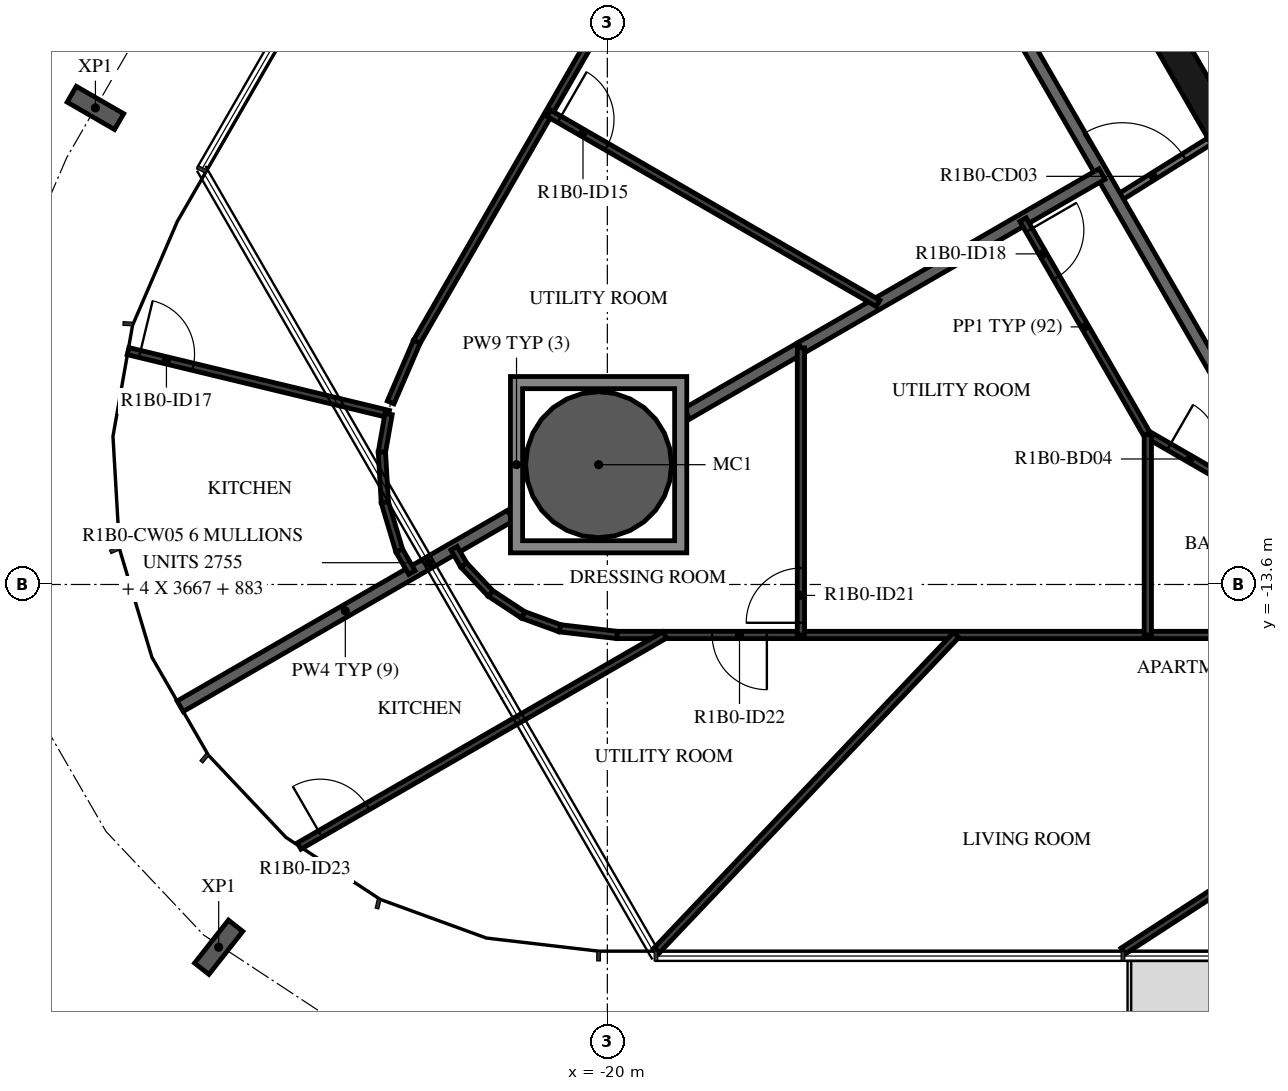
"""IFC4 building model, lengths in metres.
Left out: names, types, materials, properties, quantities, classifications, styles, units other than length and angle.
Written with IfcOpenShell. Run it as: python <this file> out.ifc"""

import sys

from ifc_helpers import new_model, si_unit, direction, frame, frame_2d, origin, origin_2d, place, context, subcontext, project, spatial, polyline, rectangle, hollow_circle, i_section, outline, extrude, element, fill, save


model = new_model("IFC4")
c1 = context("Model", 3, precision=1e-05, world=origin(), true_north=direction((0.0, 1.0)))
c2 = subcontext(c1, "Body", "Model", "MODEL_VIEW")
j1 = project(units=[si_unit("LENGTHUNIT", "METRE"), si_unit("PLANEANGLEUNIT", "RADIAN")], contexts=[c1])
p1 = place(None, origin())
s1 = spatial("IfcSite", under=j1, at=p1, CompositionType="ELEMENT")
p2 = place(p1, origin())
s2 = spatial("IfcBuilding", under=s1, at=p2, CompositionType="ELEMENT")
p3 = place(p2, frame((0.0, 0.0, 52.4)))
s3 = spatial("IfcBuildingStorey", under=s2, at=p3, CompositionType="ELEMENT", Elevation=52.4)
p4 = place(p3, frame((-20.144, -11.63, -0.38), z_axis=(0.0, 0.0, 1.0), x_axis=(1.0, 0.0, 0.0)))
e1 = element("IfcColumn", 1, at=p4, inside=s3, PredefinedType="COLUMN", context=c2, shape_type="SweptSolid", body=[
    extrude(hollow_circle(Radius=1.2, WallThickness=0.06, at=origin_2d()), origin(), (0.0, 0.0, 1.0), 3.5),
])
for number, where, z_axis, x_axis in (
    (2, (-28.419, -5.763, -0.38), (0.0, 0.0, 1.0), (0.5, 0.866, 0.0)),
    (3, (-26.392, -19.565, -0.38), (0.0, 0.0, 1.0), (-0.786, 0.619, 0.0)),
):
    element("IfcColumn", number, at=place(p3, frame(where, z_axis=z_axis, x_axis=x_axis)), inside=s3, PredefinedType="COLUMN", context=c2, shape_type="SweptSolid", body=[
        extrude(i_section(OverallWidth=0.3, OverallDepth=0.9, WebThickness=0.019, FlangeThickness=0.035, FilletRadius=0.03, at=origin_2d()), origin(), (0.0, 0.0, 1.0), 3.5),
    ])
p5 = place(p3, frame((-10.845, -4.51, 0.0), z_axis=(0.0, 0.0, 1.0), x_axis=(0.500087131594, -0.865975092491, 0.0)))
e4 = element("IfcWall", 4, at=p5, inside=s3, PredefinedType="SHEAR", context=c2, shape_type="SweptSolid", body=[
    extrude(rectangle(XDim=3.033, YDim=0.5, at=frame_2d((1.516, 0.0))), origin(), (0.0, 0.0, 1.0), 3.12),
])
p6 = place(p3, frame((-11.625, -7.264, 0.0), z_axis=(0.0, 0.0, 1.0), x_axis=(0.84803632456, 0.529938102259, 0.0)))
e5 = element("IfcWall", 5, at=p6, inside=s3, PredefinedType="PARTITIONING", context=c2, shape_type="SweptSolid", body=[
    extrude(rectangle(XDim=1.804, YDim=0.12, at=frame_2d((0.902, 0.0))), origin(), (0.0, 0.0, 1.0), 3.12),
])
p7 = place(p6, frame((0.11, 0.0, 0.0)))
e6 = element("IfcOpeningElement", 6, at=p7, cuts=e5, PredefinedType="OPENING", context=c2, shape_type="SweptSolid", body=[
    extrude(rectangle(XDim=1.2, YDim=2.1, at=frame_2d((0.6, 1.05))), frame((0.0, 0.07, 0.0), z_axis=(0.0, -1.0, 0.0), x_axis=(1.0, 0.0, 0.0)), (0.0, 0.0, 1.0), 0.14),
])
p8 = place(p3, frame((-13.7, -3.671, 0.0), z_axis=(0.0, 0.0, 1.0), x_axis=(0.500001669485, -0.866024439905, 0.0)))
e7 = element("IfcWall", 7, at=p8, inside=s3, PredefinedType="STANDARD", context=c2, shape_type="SweptSolid", body=[
    extrude(rectangle(XDim=7.342, YDim=0.2, at=frame_2d((3.671, 0.0))), origin(), (0.0, 0.0, 1.0), 3.12),
])
p9 = place(p3, frame((-16.817, -9.709, 0.0), z_axis=(0.0, 0.0, 1.0), x_axis=(0.86604338933, 0.499968846828, 0.0)))
e8 = element("IfcWall", 8, at=p9, inside=s3, PredefinedType="STANDARD", context=c2, shape_type="SweptSolid", body=[
    extrude(rectangle(XDim=5.718, YDim=0.2, at=frame_2d((2.859, 0.0))), origin(), (0.0, 0.0, 1.0), 3.12),
])
p10 = place(p3, frame((-27.025, -15.603, 0.0), z_axis=(0.0, 0.0, 1.0), x_axis=(0.866030653443, 0.499990907215, 0.0)))
e9 = element("IfcWall", 9, at=p10, inside=s3, PredefinedType="STANDARD", context=c2, shape_type="SweptSolid", body=[
    extrude(rectangle(XDim=6.271, YDim=0.2, at=frame_2d((3.136, 0.0))), origin(), (0.0, 0.0, 1.0), 3.12),
])
p11 = place(p3, frame((-18.694, -10.793, 0.0), z_axis=(0.0, 0.0, 1.0), x_axis=(0.866009251978, 0.500027974705, 0.0)))
e10 = element("IfcWall", 10, at=p11, inside=s3, PredefinedType="STANDARD", context=c2, shape_type="SweptSolid", body=[
    extrude(rectangle(XDim=2.167, YDim=0.2, at=frame_2d((1.084, 0.0))), origin(), (0.0, 0.0, 1.0), 3.12),
])
p12 = place(p3, frame((-17.13, 0.79, 0.0), z_axis=(0.0, 0.0, 1.0), x_axis=(-0.499997052475, -0.866027105532, 0.0)))
e11 = element("IfcWall", 11, at=p12, inside=s3, PredefinedType="PARTITIONING", context=c2, shape_type="SweptSolid", body=[
    extrude(rectangle(XDim=12.006, YDim=0.12, at=frame_2d((6.003, 0.0))), origin(), (0.0, 0.0, 1.0), 3.12),
])
p13 = place(p12, frame((1.498, 0.0, 0.0)))
e12 = element("IfcOpeningElement", 12, at=p13, cuts=e11, PredefinedType="OPENING", context=c2, shape_type="SweptSolid", body=[
    extrude(rectangle(XDim=0.9, YDim=2.1, at=frame_2d((0.45, 1.05))), frame((0.0, 0.07, 0.0), z_axis=(0.0, -1.0, 0.0), x_axis=(1.0, 0.0, 0.0)), (0.0, 0.0, 1.0), 0.14),
])
p14 = place(p3, frame((-20.963, -5.85, 0.0), z_axis=(0.0, 0.0, 1.0), x_axis=(0.866021746608, -0.500006334362, 0.0)))
e13 = element("IfcWall", 13, at=p14, inside=s3, PredefinedType="PARTITIONING", context=c2, shape_type="SweptSolid", body=[
    extrude(rectangle(XDim=6.253, YDim=0.12, at=frame_2d((3.127, 0.0))), origin(), (0.0, 0.0, 1.0), 3.12),
])
p15 = place(p14, frame((0.2, 0.0, 0.0)))
e14 = element("IfcOpeningElement", 14, at=p15, cuts=e13, PredefinedType="OPENING", context=c2, shape_type="SweptSolid", body=[
    extrude(rectangle(XDim=0.9, YDim=2.1, at=frame_2d((0.45, 1.05))), frame((0.0, 0.07, 0.0), z_axis=(0.0, -1.0, 0.0), x_axis=(1.0, 0.0, 0.0)), (0.0, 0.0, 1.0), 0.14),
])
p16 = place(p3, frame((-23.564, -10.606, 0.0), z_axis=(0.0, 0.0, 1.0), x_axis=(0.396195073027, 0.918166359713, 0.0)))
e15 = element("IfcWall", 15, at=p16, inside=s3, PredefinedType="PARTITIONING", context=c2, shape_type="SweptSolid", body=[
    extrude(rectangle(XDim=1.087, YDim=0.12, at=frame_2d((0.543, 0.0))), origin(), (0.0, 0.0, 1.0), 3.12),
])
p17 = place(p3, frame((-27.883, -9.762, 0.0), z_axis=(0.0, 0.0, 1.0), x_axis=(0.972097015458, -0.234579181809, 0.0)))
e16 = element("IfcWall", 16, at=p17, inside=s3, PredefinedType="PARTITIONING", context=c2, shape_type="SweptSolid", body=[
    extrude(rectangle(XDim=4.409, YDim=0.12, at=frame_2d((2.204, 0.0))), origin(), (0.0, 0.0, 1.0), 3.12),
])
p18 = place(p17, frame((0.2, 0.0, 0.0)))
e17 = element("IfcOpeningElement", 17, at=p18, cuts=e16, PredefinedType="OPENING", context=c2, shape_type="SweptSolid", body=[
    extrude(rectangle(XDim=0.9, YDim=2.1, at=frame_2d((0.45, 1.05))), frame((0.0, 0.07, 0.0), z_axis=(0.0, -1.0, 0.0), x_axis=(1.0, 0.0, 0.0)), (0.0, 0.0, 1.0), 0.14),
])
p19 = place(p3, frame((-23.597, -10.796, 0.0), z_axis=(0.0, 0.0, 1.0), x_axis=(-0.173610040386, -0.984814476882, 0.0)))
e18 = element("IfcWall", 18, at=p19, inside=s3, PredefinedType="PARTITIONING", context=c2, shape_type="SweptSolid", body=[
    extrude(rectangle(XDim=0.636, YDim=0.12, at=frame_2d((0.318, 0.0))), origin(), (0.0, 0.0, 1.0), 3.12),
])
p20 = place(p3, frame((-23.708, -11.422, 0.0), z_axis=(0.0, 0.0, 1.0), x_axis=(0.058031280246, -0.998314765248, 0.0)))
e19 = element("IfcWall", 19, at=p20, inside=s3, PredefinedType="PARTITIONING", context=c2, shape_type="SweptSolid", body=[
    extrude(rectangle(XDim=0.829, YDim=0.12, at=frame_2d((0.415, 0.0))), origin(), (0.0, 0.0, 1.0), 3.12),
])
p21 = place(p3, frame((-23.659, -12.25, 0.0), z_axis=(0.0, 0.0, 1.0), x_axis=(0.286834510868, -0.957980147694, 0.0)))
e20 = element("IfcWall", 20, at=p21, inside=s3, PredefinedType="PARTITIONING", context=c2, shape_type="SweptSolid", body=[
    extrude(rectangle(XDim=0.829, YDim=0.12, at=frame_2d((0.415, 0.0))), origin(), (0.0, 0.0, 1.0), 3.12),
])
p22 = place(p3, frame((-23.422, -13.044, 0.0), z_axis=(0.0, 0.0, 1.0), x_axis=(0.50013037474, -0.865950118807, 0.0)))
e21 = element("IfcWall", 21, at=p22, inside=s3, PredefinedType="PARTITIONING", context=c2, shape_type="SweptSolid", body=[
    extrude(rectangle(XDim=0.415, YDim=0.12, at=frame_2d((0.207, 0.0))), origin(), (0.0, 0.0, 1.0), 3.12),
])
p23 = place(p3, frame((-13.164, -7.6, 0.0), z_axis=(0.0, 0.0, 1.0), x_axis=(0.500000928893, -0.866024867487, 0.0)))
e22 = element("IfcWall", 22, at=p23, inside=s3, PredefinedType="PARTITIONING", context=c2, shape_type="SweptSolid", body=[
    extrude(rectangle(XDim=4.073, YDim=0.12, at=frame_2d((2.036, 0.0))), origin(), (0.0, 0.0, 1.0), 3.12),
])
p24 = place(p23, frame((0.2, 0.0, 0.0)))
e23 = element("IfcOpeningElement", 23, at=p24, cuts=e22, PredefinedType="OPENING", context=c2, shape_type="SweptSolid", body=[
    extrude(rectangle(XDim=0.9, YDim=2.1, at=frame_2d((0.45, 1.05))), frame((0.0, 0.07, 0.0), z_axis=(0.0, -1.0, 0.0), x_axis=(1.0, 0.0, 0.0)), (0.0, 0.0, 1.0), 0.14),
])
p25 = place(p3, frame((-11.112, -11.136, 0.0), z_axis=(0.0, 0.0, 1.0), x_axis=(0.866017718408, -0.500013311227, 0.0)))
e24 = element("IfcWall", 24, at=p25, inside=s3, PredefinedType="PARTITIONING", context=c2, shape_type="SweptSolid", body=[
    extrude(rectangle(XDim=6.588, YDim=0.12, at=frame_2d((3.294, 0.0))), origin(), (0.0, 0.0, 1.0), 3.12),
])
p26 = place(p25, frame((0.4, 0.0, 0.0)))
e25 = element("IfcOpeningElement", 25, at=p26, cuts=e24, PredefinedType="OPENING", context=c2, shape_type="SweptSolid", body=[
    extrude(rectangle(XDim=0.8, YDim=2.1, at=frame_2d((0.4, 1.05))), frame((0.0, 0.07, 0.0), z_axis=(0.0, -1.0, 0.0), x_axis=(1.0, 0.0, 0.0)), (0.0, 0.0, 1.0), 0.14),
])
p27 = place(p3, frame((-5.407, -14.43, 0.0), z_axis=(0.0, 0.0, 1.0), x_axis=(-1.0, 0.0, 0.0)))
e26 = element("IfcWall", 26, at=p27, inside=s3, PredefinedType="PARTITIONING", context=c2, shape_type="SweptSolid", body=[
    extrude(rectangle(XDim=14.434, YDim=0.12, at=frame_2d((7.217, 0.0))), origin(), (0.0, 0.0, 1.0), 3.12),
])
p28 = place(p27, frame((11.97, 0.0, 0.0)))
e27 = element("IfcOpeningElement", 27, at=p28, cuts=e26, PredefinedType="OPENING", context=c2, shape_type="SweptSolid", body=[
    extrude(rectangle(XDim=0.9, YDim=2.1, at=frame_2d((0.45, 1.05))), frame((0.0, 0.07, 0.0), z_axis=(0.0, -1.0, 0.0), x_axis=(1.0, 0.0, 0.0)), (0.0, 0.0, 1.0), 0.14),
])
p29 = place(p3, frame((-19.841, -14.43, 0.0), z_axis=(0.0, 0.0, 1.0), x_axis=(-0.993245320107, 0.116033331788, 0.0)))
e28 = element("IfcWall", 28, at=p29, inside=s3, PredefinedType="PARTITIONING", context=c2, shape_type="SweptSolid", body=[
    extrude(rectangle(XDim=0.947, YDim=0.12, at=frame_2d((0.473, 0.0))), origin(), (0.0, 0.0, 1.0), 3.12),
])
for number, where, z_axis, x_axis in (
    (29, (-20.781, -14.32, 0.0), (0.0, 0.0, 1.0), (-0.94, 0.342, 0.0)),
    (30, (-21.385, -14.101, 0.0), (0.0, 0.0, 1.0), (-0.835, 0.55, 0.0)),
    (31, (-21.921, -13.748, 0.0), (0.0, 0.0, 1.0), (-0.686, 0.727, 0.0)),
):
    element("IfcWall", number, at=place(p3, frame(where, z_axis=z_axis, x_axis=x_axis)), inside=s3, PredefinedType="PARTITIONING", context=c2, shape_type="SweptSolid", body=[
        extrude(rectangle(XDim=0.642, YDim=0.12, at=frame_2d((0.321, 0.0))), origin(), (0.0, 0.0, 1.0), 3.12),
    ])
p30 = place(p3, frame((-22.361, -13.281, 0.0), z_axis=(0.0, 0.0, 1.0), x_axis=(-0.499656614129, 0.86622356696, 0.0)))
e32 = element("IfcWall", 32, at=p30, inside=s3, PredefinedType="PARTITIONING", context=c2, shape_type="SweptSolid", body=[
    extrude(rectangle(XDim=0.321, YDim=0.12, at=frame_2d((0.161, 0.0))), origin(), (0.0, 0.0, 1.0), 3.12),
])
p31 = place(p3, frame((-25.068, -17.901, 0.0), z_axis=(0.0, 0.0, 1.0), x_axis=(0.866025136247, 0.500000463387, 0.0)))
e33 = element("IfcWall", 33, at=p31, inside=s3, PredefinedType="PARTITIONING", context=c2, shape_type="SweptSolid", body=[
    extrude(rectangle(XDim=6.943, YDim=0.12, at=frame_2d((3.471, 0.0))), origin(), (0.0, 0.0, 1.0), 3.12),
])
p32 = place(p31, frame((0.4, 0.0, 0.0)))
e34 = element("IfcOpeningElement", 34, at=p32, cuts=e33, PredefinedType="OPENING", context=c2, shape_type="SweptSolid", body=[
    extrude(rectangle(XDim=0.9, YDim=2.1, at=frame_2d((0.45, 1.05))), frame((0.0, 0.07, 0.0), z_axis=(0.0, -1.0, 0.0), x_axis=(1.0, 0.0, 0.0)), (0.0, 0.0, 1.0), 0.14),
])
p33 = place(p3, frame((-16.817, -14.43, 0.0), z_axis=(0.0, 0.0, 1.0), x_axis=(0.0, 1.0, 0.0)))
e35 = element("IfcWall", 35, at=p33, inside=s3, PredefinedType="PARTITIONING", context=c2, shape_type="SweptSolid", body=[
    extrude(rectangle(XDim=4.721, YDim=0.12, at=frame_2d((2.36, 0.0))), origin(), (0.0, 0.0, 1.0), 3.12),
])
p34 = place(p33, frame((0.2, 0.0, 0.0)))
e36 = element("IfcOpeningElement", 36, at=p34, cuts=e35, PredefinedType="OPENING", context=c2, shape_type="SweptSolid", body=[
    extrude(rectangle(XDim=0.9, YDim=2.1, at=frame_2d((0.45, 1.05))), frame((0.0, 0.07, 0.0), z_axis=(0.0, -1.0, 0.0), x_axis=(1.0, 0.0, 0.0)), (0.0, 0.0, 1.0), 0.14),
])
p35 = place(p3, frame((-11.112, -14.43, 0.0), z_axis=(0.0, 0.0, 1.0), x_axis=(0.0, 1.0, 0.0)))
e37 = element("IfcWall", 37, at=p35, inside=s3, PredefinedType="PARTITIONING", context=c2, shape_type="SweptSolid", body=[
    extrude(rectangle(XDim=3.294, YDim=0.12, at=frame_2d((1.647, 0.0))), origin(), (0.0, 0.0, 1.0), 3.12),
])
p36 = place(p3, frame((-19.2, -19.63, 0.0), z_axis=(0.0, 0.0, 1.0), x_axis=(0.688551680792, 0.72518727435, 0.0)))
e38 = element("IfcWall", 38, at=p36, inside=s3, PredefinedType="PARTITIONING", context=c2, shape_type="SweptSolid", body=[
    extrude(rectangle(XDim=7.17, YDim=0.12, at=frame_2d((3.585, 0.0))), origin(), (0.0, 0.0, 1.0), 3.12),
])
p37 = place(p3, frame((-11.52, -19.63, 0.0), z_axis=(0.0, 0.0, 1.0), x_axis=(0.838545516556, 0.544831548888, 0.0)))
e39 = element("IfcWall", 39, at=p37, inside=s3, PredefinedType="PARTITIONING", context=c2, shape_type="SweptSolid", body=[
    extrude(rectangle(XDim=6.677, YDim=0.12, at=frame_2d((3.339, 0.0))), origin(), (0.0, 0.0, 1.0), 3.12),
])
p38 = place(p3, origin())
e40 = element("IfcWall", 40, at=p38, inside=s3, PredefinedType="STANDARD", context=c2, shape_type="SweptSolid", body=[
    extrude(outline(polyline([(-18.694, -10.18), (-18.694, -13.08), (-21.594, -13.08), (-21.594, -10.18), (-18.694, -10.18)]), holes=[polyline([(-21.394, -12.88), (-18.894, -12.88), (-18.894, -10.38), (-21.394, -10.38), (-21.394, -12.88)])]), origin(), (0.0, 0.0, 1.0), 3.12),
])
p39 = place(p15, origin())
e41 = element("IfcDoor", 41, at=p39, inside=s3, OperationType="SINGLE_SWING_RIGHT", PredefinedType="DOOR", context=c2, shape_type="SweptSolid", body=[
    extrude(rectangle(XDim=0.9, YDim=2.1, at=frame_2d((0.45, 1.05))), frame((0.0, 0.025, 0.0), z_axis=(0.0, -1.0, 0.0), x_axis=(1.0, 0.0, 0.0)), (0.0, 0.0, 1.0), 0.05),
])
fill(e14, e41)
p40 = place(p18, origin())
e42 = element("IfcDoor", 42, at=p40, inside=s3, OperationType="SINGLE_SWING_RIGHT", PredefinedType="DOOR", context=c2, shape_type="SweptSolid", body=[
    extrude(rectangle(XDim=0.9, YDim=2.1, at=frame_2d((0.45, 1.05))), frame((0.0, 0.025, 0.0), z_axis=(0.0, -1.0, 0.0), x_axis=(1.0, 0.0, 0.0)), (0.0, 0.0, 1.0), 0.05),
])
fill(e17, e42)
p41 = place(p24, origin())
e43 = element("IfcDoor", 43, at=p41, inside=s3, OperationType="SINGLE_SWING_LEFT", PredefinedType="DOOR", context=c2, shape_type="SweptSolid", body=[
    extrude(rectangle(XDim=0.9, YDim=2.1, at=frame_2d((0.45, 1.05))), frame((0.0, 0.025, 0.0), z_axis=(0.0, -1.0, 0.0), x_axis=(1.0, 0.0, 0.0)), (0.0, 0.0, 1.0), 0.05),
])
fill(e23, e43)
p42 = place(p26, origin())
e44 = element("IfcDoor", 44, at=p42, inside=s3, OperationType="SINGLE_SWING_LEFT", PredefinedType="DOOR", context=c2, shape_type="SweptSolid", body=[
    extrude(rectangle(XDim=0.8, YDim=2.1, at=frame_2d((0.4, 1.05))), frame((0.0, 0.025, 0.0), z_axis=(0.0, -1.0, 0.0), x_axis=(1.0, 0.0, 0.0)), (0.0, 0.0, 1.0), 0.05),
])
fill(e25, e44)
p43 = place(p34, origin())
e45 = element("IfcDoor", 45, at=p43, inside=s3, OperationType="SINGLE_SWING_LEFT", PredefinedType="DOOR", context=c2, shape_type="SweptSolid", body=[
    extrude(rectangle(XDim=0.9, YDim=2.1, at=frame_2d((0.45, 1.05))), frame((0.0, 0.025, 0.0), z_axis=(0.0, -1.0, 0.0), x_axis=(1.0, 0.0, 0.0)), (0.0, 0.0, 1.0), 0.05),
])
fill(e36, e45)
p44 = place(p28, origin())
e46 = element("IfcDoor", 46, at=p44, inside=s3, OperationType="SINGLE_SWING_LEFT", PredefinedType="DOOR", context=c2, shape_type="SweptSolid", body=[
    extrude(rectangle(XDim=0.9, YDim=2.1, at=frame_2d((0.45, 1.05))), frame((0.0, 0.025, 0.0), z_axis=(0.0, -1.0, 0.0), x_axis=(1.0, 0.0, 0.0)), (0.0, 0.0, 1.0), 0.05),
])
fill(e27, e46)
p45 = place(p32, origin())
e47 = element("IfcDoor", 47, at=p45, inside=s3, OperationType="SINGLE_SWING_LEFT", PredefinedType="DOOR", context=c2, shape_type="SweptSolid", body=[
    extrude(rectangle(XDim=0.9, YDim=2.1, at=frame_2d((0.45, 1.05))), frame((0.0, 0.025, 0.0), z_axis=(0.0, -1.0, 0.0), x_axis=(1.0, 0.0, 0.0)), (0.0, 0.0, 1.0), 0.05),
])
fill(e34, e47)
p46 = place(p7, origin())
e48 = element("IfcDoor", 48, at=p46, inside=s3, OperationType="DOUBLE_DOOR_SINGLE_SWING", PredefinedType="DOOR", context=c2, shape_type="SweptSolid", body=[
    extrude(rectangle(XDim=1.2, YDim=2.1, at=frame_2d((0.6, 1.05))), frame((0.0, 0.025, 0.0), z_axis=(0.0, -1.0, 0.0), x_axis=(1.0, 0.0, 0.0)), (0.0, 0.0, 1.0), 0.05),
])
fill(e6, e48)
save(model, sys.argv[1])
